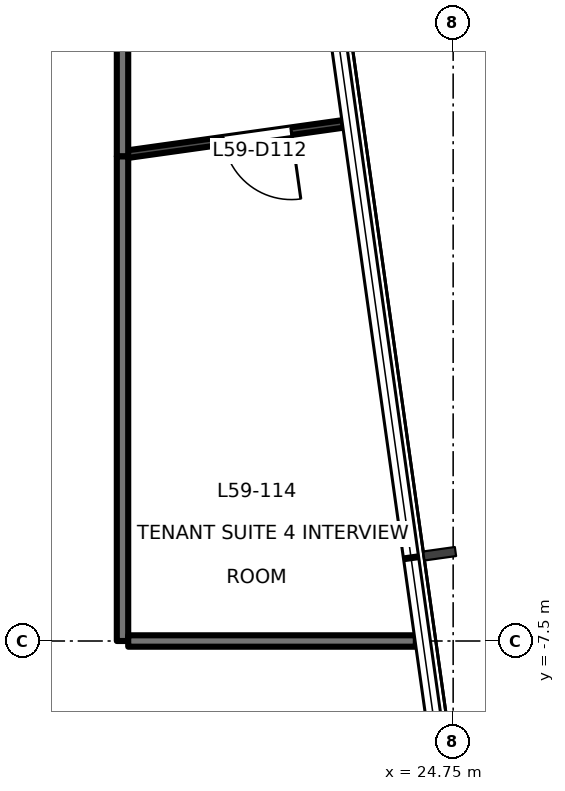
"""IFC4 building model, lengths in metres.
Left out: names, types, materials, properties, quantities, classifications, styles, units other than length and angle.
Written with IfcOpenShell. Run it as: python <this file> out.ifc"""

import sys

from ifc_helpers import new_model, si_unit, direction, frame, frame_2d, origin, place, context, subcontext, project, spatial, rectangle, extrude, element, fill, save


model = new_model("IFC4")
c1 = context("Model", 3, precision=1e-05, world=origin(), true_north=direction((0.0, 1.0)))
c2 = subcontext(c1, "Body", "Model", "MODEL_VIEW")
j1 = project(units=[si_unit("LENGTHUNIT", "METRE"), si_unit("PLANEANGLEUNIT", "RADIAN")], contexts=[c1])
p1 = place(None, origin())
s1 = spatial("IfcSite", under=j1, at=p1, CompositionType="ELEMENT")
p2 = place(p1, origin())
s2 = spatial("IfcBuilding", under=s1, at=p2, CompositionType="ELEMENT")
p3 = place(p2, frame((0.0, 0.0, 259.0)))
s3 = spatial("IfcBuildingStorey", under=s2, at=p3, CompositionType="ELEMENT", Elevation=259.0)
p4 = place(p3, frame((20.4, 5.5, 0.0), z_axis=(0.0, 0.0, 1.0), x_axis=(0.0, -1.0, 0.0)))
e1 = element("IfcWall", 1, at=p4, inside=s3, PredefinedType="PARTITIONING", context=c2, shape_type="SweptSolid", body=[
    extrude(rectangle(XDim=6.625, YDim=0.15, at=frame_2d((3.312, 0.0))), origin(), (0.0, 0.0, 1.0), 3.4),
])
p5 = place(p4, frame((2.562, 0.0, 0.0)))
e2 = element("IfcOpeningElement", 2, at=p5, cuts=e1, PredefinedType="OPENING", context=c2, shape_type="SweptSolid", body=[
    extrude(rectangle(XDim=1.5, YDim=2.1, at=frame_2d((0.75, 1.05))), frame((0.0, 0.085, 0.0), z_axis=(0.0, -1.0, 0.0), x_axis=(1.0, 0.0, 0.0)), (0.0, 0.0, 1.0), 0.171),
])
p6 = place(p3, frame((20.4, -1.125, 0.0), z_axis=(0.0, 0.0, 1.0), x_axis=(0.0, -1.0, 0.0)))
e3 = element("IfcWall", 3, at=p6, inside=s3, PredefinedType="PARTITIONING", context=c2, shape_type="SweptSolid", body=[
    extrude(rectangle(XDim=6.375, YDim=0.15, at=frame_2d((3.188, 0.0))), origin(), (0.0, 0.0, 1.0), 3.4),
])
p7 = place(p3, frame((20.475, -7.5, 0.0), z_axis=(0.0, 0.0, 1.0), x_axis=(1.0, 0.0, 0.0)))
e4 = element("IfcWall", 4, at=p7, inside=s3, PredefinedType="PARTITIONING", context=c2, shape_type="SweptSolid", body=[
    extrude(rectangle(XDim=3.784, YDim=0.15, at=frame_2d((1.892, 0.0))), origin(), (0.0, 0.0, 1.0), 3.7),
])
p8 = place(p3, frame((23.303, -0.697, 0.0), z_axis=(0.0, 0.0, 1.0), x_axis=(-0.990291093887, -0.139009170086, 0.0)))
e5 = element("IfcWall", 5, at=p8, inside=s3, PredefinedType="PARTITIONING", context=c2, shape_type="SweptSolid", body=[
    extrude(rectangle(XDim=2.863, YDim=0.1, at=frame_2d((1.431, 0.0))), origin(), (0.0, 0.0, 1.0), 3.7),
])
p9 = place(p8, frame((0.689, 0.0, 0.0)))
e6 = element("IfcOpeningElement", 6, at=p9, cuts=e5, PredefinedType="OPENING", context=c2, shape_type="SweptSolid", body=[
    extrude(rectangle(XDim=0.9, YDim=2.1, at=frame_2d((0.45, 1.05))), frame((0.0, 0.061, 0.0), z_axis=(0.0, -1.0, 0.0), x_axis=(1.0, 0.0, 0.0)), (0.0, 0.0, 1.0), 0.121),
])
p10 = place(p9, origin())
e7 = element("IfcDoor", 7, at=p10, inside=s3, OperationType="SINGLE_SWING_LEFT", PredefinedType="DOOR", context=c2, shape_type="SweptSolid", body=[
    extrude(rectangle(XDim=0.9, YDim=2.1, at=frame_2d((0.45, 1.05))), frame((0.0, 0.025, 0.0), z_axis=(0.0, -1.0, 0.0), x_axis=(1.0, 0.0, 0.0)), (0.0, 0.0, 1.0), 0.05),
])
fill(e6, e7)
save(model, sys.argv[1])
